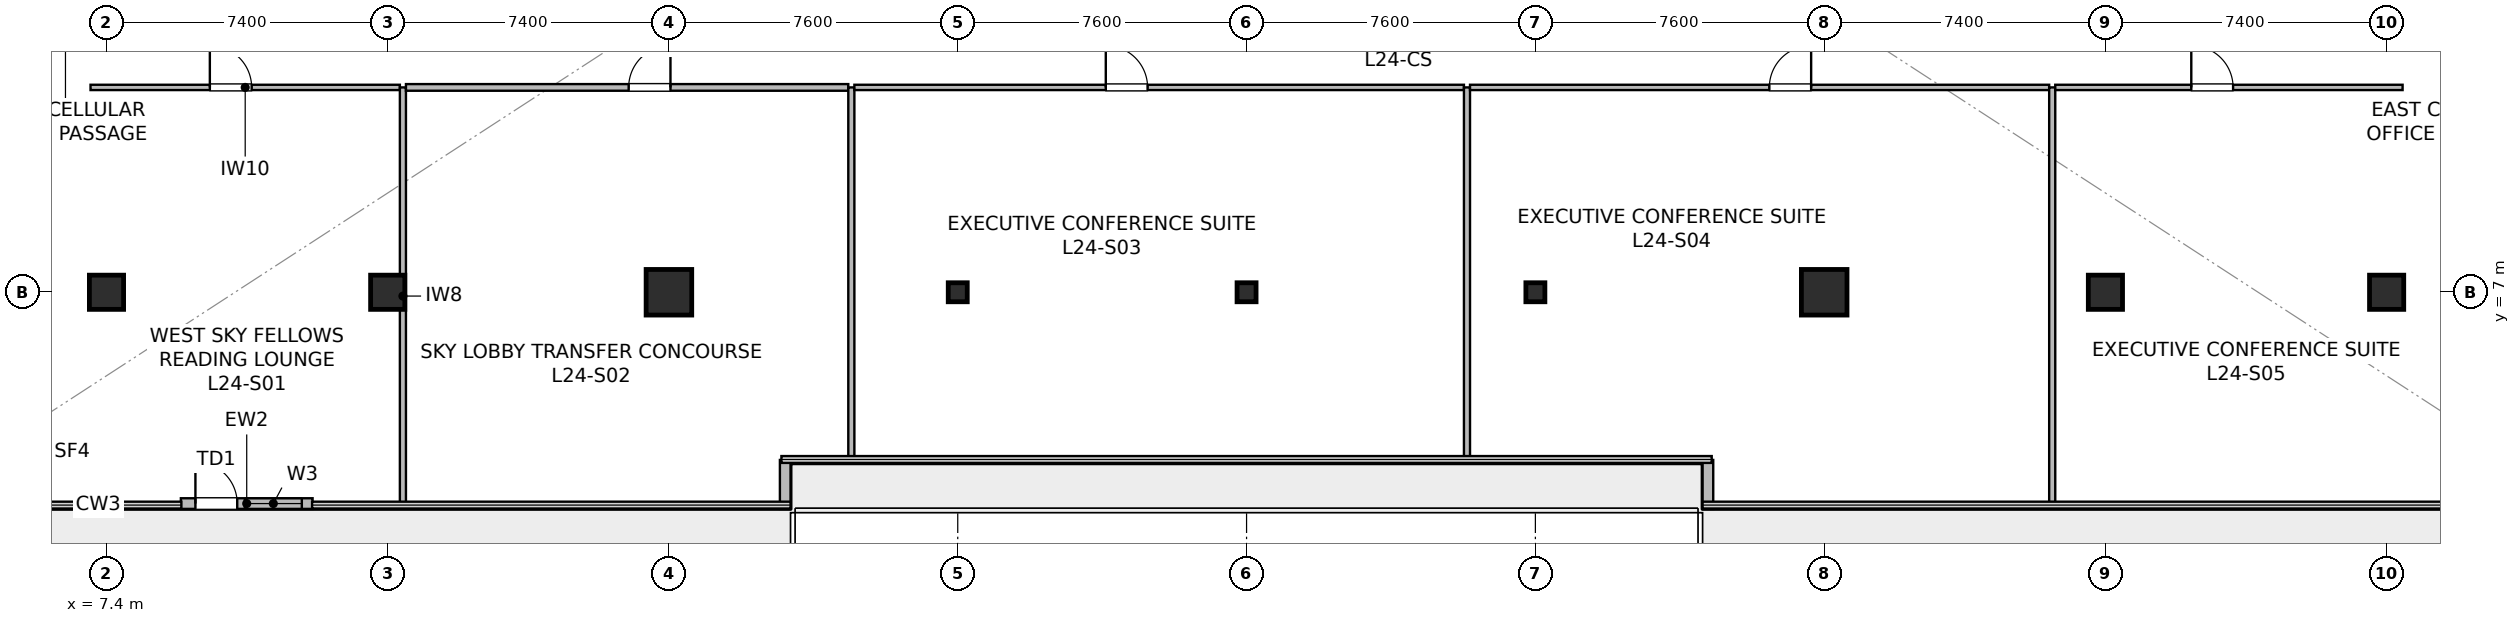
"""IFC4 building model, lengths in metres.
Left out: names, types, materials, properties, quantities, classifications, styles, units other than length and angle.
Written with IfcOpenShell. Run it as: python <this file> out.ifc"""

import sys

from ifc_helpers import new_model, si_unit, direction, frame, frame_2d, origin, origin_2d, place, context, subcontext, project, spatial, rectangle, hollow_rectangle, extrude, source, transform, mapped, element, fill, save


model = new_model("IFC4")
c1 = context("Model", 3, precision=1e-05, world=origin(), true_north=direction((0.0, 1.0)))
c2 = subcontext(c1, "Body", "Model", "MODEL_VIEW")
j1 = project(units=[si_unit("LENGTHUNIT", "METRE"), si_unit("PLANEANGLEUNIT", "RADIAN")], contexts=[c1])
p1 = place(None, origin())
s1 = spatial("IfcSite", under=j1, at=p1, CompositionType="ELEMENT")
p2 = place(p1, origin())
s2 = spatial("IfcBuilding", under=s1, at=p2, CompositionType="ELEMENT")
p3 = place(p2, frame((0.0, 0.0, 100.3)))
s3 = spatial("IfcBuildingStorey", under=s2, at=p3, CompositionType="ELEMENT", Elevation=100.3)
m1 = source(origin(), c2, "Body", "SweptSolid", [
    extrude(rectangle(XDim=0.9, YDim=0.9, at=origin_2d()), origin(), (0.0, 0.0, 1.0), 4.8),
])
p4 = place(p3, frame((14.8, 7.0, 0.0), z_axis=(0.0, 0.0, 1.0), x_axis=(1.0, 0.0, 0.0)))
e1 = element("IfcColumn", 1, at=p4, inside=s3, PredefinedType="COLUMN", context=c2, shape_type="MappedRepresentation", body=[
    mapped(m1, transform((0.0, 0.0, 0.0), scale=1.0)),
])
m2 = source(origin(), c2, "Body", "SweptSolid", [
    extrude(rectangle(XDim=1.2, YDim=1.2, at=origin_2d()), origin(), (0.0, 0.0, 1.0), 4.8),
])
for number, where, z_axis, x_axis in (
    (2, (22.2, 7.0, 0.0), (0.0, 0.0, 1.0), (1.0, 0.0, 0.0)),
    (3, (52.6, 7.0, 0.0), (0.0, 0.0, 1.0), (1.0, 0.0, 0.0)),
):
    element("IfcColumn", number, at=place(p3, frame(where, z_axis=z_axis, x_axis=x_axis)), inside=s3, PredefinedType="COLUMN", context=c2, shape_type="MappedRepresentation", body=[
        mapped(m2, transform((0.0, 0.0, 0.0), scale=1.0)),
    ])
for number, where, z_axis, x_axis in (
    (4, (60.0, 7.0, 0.0), (0.0, 0.0, 1.0), (1.0, 0.0, 0.0)),
    (5, (7.4, 7.0, 0.0), (0.0, 0.0, 1.0), (1.0, 0.0, 0.0)),
    (6, (67.4, 7.0, 0.0), (0.0, 0.0, 1.0), (1.0, 0.0, 0.0)),
):
    element("IfcColumn", number, at=place(p3, frame(where, z_axis=z_axis, x_axis=x_axis)), inside=s3, PredefinedType="COLUMN", context=c2, shape_type="MappedRepresentation", body=[
        mapped(m1, transform((0.0, 0.0, 0.0), scale=1.0)),
    ])
m3 = source(origin(), c2, "Body", "SweptSolid", [
    extrude(hollow_rectangle(XDim=0.5, YDim=0.5, WallThickness=0.022, at=origin_2d()), origin(), (0.0, 0.0, 1.0), 4.8),
])
for number, where, z_axis, x_axis in (
    (7, (29.8, 7.0, 0.0), (0.0, 0.0, 1.0), (1.0, 0.0, 0.0)),
    (8, (37.4, 7.0, 0.0), (0.0, 0.0, 1.0), (1.0, 0.0, 0.0)),
    (9, (45.0, 7.0, 0.0), (0.0, 0.0, 1.0), (1.0, 0.0, 0.0)),
):
    element("IfcColumn", number, at=place(p3, frame(where, z_axis=z_axis, x_axis=x_axis)), inside=s3, PredefinedType="COLUMN", context=c2, shape_type="MappedRepresentation", body=[
        mapped(m3, transform((0.0, 0.0, 0.0), scale=1.0)),
    ])
p5 = place(p3, frame((9.357, 1.44, 0.0), z_axis=(0.0, 0.0, 1.0), x_axis=(1.0, 0.0, 0.0)))
e10 = element("IfcWall", 10, at=p5, inside=s3, PredefinedType="STANDARD", context=c2, shape_type="SweptSolid", body=[
    extrude(rectangle(XDim=3.466, YDim=0.28, at=frame_2d((1.733, 0.0))), origin(), (0.0, 0.0, 1.0), 4.49),
])
p6 = place(p5, frame((0.383, 0.0, 0.0)))
e11 = element("IfcOpeningElement", 11, at=p6, cuts=e10, PredefinedType="OPENING", context=c2, shape_type="SweptSolid", body=[
    extrude(rectangle(XDim=1.1, YDim=2.2, at=frame_2d((0.55, 1.1))), frame((0.0, 0.15, 0.0), z_axis=(0.0, -1.0, 0.0), x_axis=(1.0, 0.0, 0.0)), (0.0, 0.0, 1.0), 0.3),
])
p7 = place(p5, frame((1.683, 0.0, 0.9)))
e12 = element("IfcOpeningElement", 12, at=p7, cuts=e10, PredefinedType="OPENING", context=c2, shape_type="SweptSolid", body=[
    extrude(rectangle(XDim=1.5, YDim=2.2, at=frame_2d((0.75, 1.1))), frame((0.0, 0.15, 0.0), z_axis=(0.0, -1.0, 0.0), x_axis=(1.0, 0.0, 0.0)), (0.0, 0.0, 1.0), 0.3),
])
for number, where, z_axis, x_axis in (
    (13, (25.26, 1.3, 0.0), (0.0, 0.0, 1.0), (0.0, 1.0, 0.0)),
    (14, (49.54, 2.588, 0.0), (0.0, 0.0, 1.0), (0.0, -1.0, 0.0)),
):
    element("IfcWall", number, at=place(p3, frame(where, z_axis=z_axis, x_axis=x_axis)), inside=s3, PredefinedType="STANDARD", context=c2, shape_type="SweptSolid", body=[
        extrude(rectangle(XDim=1.288, YDim=0.28, at=frame_2d((0.644, 0.0))), origin(), (0.0, 0.0, 1.0), 4.49),
    ])
p8 = place(p3, frame((6.98, 12.39, 0.0), z_axis=(0.0, 0.0, 1.0), x_axis=(1.0, 0.0, 0.0)))
e15 = element("IfcWall", 15, at=p8, inside=s3, PredefinedType="PARTITIONING", context=c2, shape_type="SweptSolid", body=[
    extrude(rectangle(XDim=8.14, YDim=0.14, at=frame_2d((4.07, 0.0))), origin(), (0.0, 0.0, 1.0), 3.825),
])
p9 = place(p8, frame((3.14, 0.0, 0.0)))
e16 = element("IfcOpeningElement", 16, at=p9, cuts=e15, PredefinedType="OPENING", context=c2, shape_type="SweptSolid", body=[
    extrude(rectangle(XDim=1.1, YDim=2.18, at=frame_2d((0.55, 1.09))), frame((0.0, 0.08, 0.0), z_axis=(0.0, -1.0, 0.0), x_axis=(1.0, 0.0, 0.0)), (0.0, 0.0, 1.0), 0.16),
])
p10 = place(p3, frame((15.2, 1.41, 0.0), z_axis=(0.0, 0.0, 1.0), x_axis=(0.0, 1.0, 0.0)))
e17 = element("IfcWall", 17, at=p10, inside=s3, PredefinedType="PARTITIONING", context=c2, shape_type="SweptSolid", body=[
    extrude(rectangle(XDim=10.98, YDim=0.16, at=frame_2d((5.49, 0.0))), origin(), (0.0, 0.0, 1.0), 3.775),
])
p11 = place(p3, frame((15.28, 12.39, 0.0), z_axis=(0.0, 0.0, 1.0), x_axis=(1.0, 0.0, 0.0)))
e18 = element("IfcWall", 18, at=p11, inside=s3, PredefinedType="PARTITIONING", context=c2, shape_type="SweptSolid", body=[
    extrude(rectangle(XDim=11.64, YDim=0.175, at=frame_2d((5.82, 0.0))), origin(), (0.0, 0.0, 1.0), 3.825),
])
p12 = place(p11, frame((5.86, 0.0, 0.0)))
e19 = element("IfcOpeningElement", 19, at=p12, cuts=e18, PredefinedType="OPENING", context=c2, shape_type="SweptSolid", body=[
    extrude(rectangle(XDim=1.1, YDim=2.15, at=frame_2d((0.55, 1.075))), frame((0.0, 0.098, 0.0), z_axis=(0.0, -1.0, 0.0), x_axis=(1.0, 0.0, 0.0)), (0.0, 0.0, 1.0), 0.195),
])
p13 = place(p3, frame((27.0, 2.61, 0.0), z_axis=(0.0, 0.0, 1.0), x_axis=(0.0, 1.0, 0.0)))
e20 = element("IfcWall", 20, at=p13, inside=s3, PredefinedType="PARTITIONING", context=c2, shape_type="SweptSolid", body=[
    extrude(rectangle(XDim=9.78, YDim=0.16, at=frame_2d((4.89, 0.0))), origin(), (0.0, 0.0, 1.0), 3.775),
])
p14 = place(p3, frame((27.08, 12.39, 0.0), z_axis=(0.0, 0.0, 1.0), x_axis=(1.0, 0.0, 0.0)))
e21 = element("IfcWall", 21, at=p14, inside=s3, PredefinedType="PARTITIONING", context=c2, shape_type="SweptSolid", body=[
    extrude(rectangle(XDim=16.04, YDim=0.14, at=frame_2d((8.02, 0.0))), origin(), (0.0, 0.0, 1.0), 3.825),
])
p15 = place(p14, frame((6.615, 0.0, 0.0)))
e22 = element("IfcOpeningElement", 22, at=p15, cuts=e21, PredefinedType="OPENING", context=c2, shape_type="SweptSolid", body=[
    extrude(rectangle(XDim=1.1, YDim=2.18, at=frame_2d((0.55, 1.09))), frame((0.0, 0.08, 0.0), z_axis=(0.0, -1.0, 0.0), x_axis=(1.0, 0.0, 0.0)), (0.0, 0.0, 1.0), 0.16),
])
p16 = place(p3, frame((43.2, 2.61, 0.0), z_axis=(0.0, 0.0, 1.0), x_axis=(0.0, 1.0, 0.0)))
e23 = element("IfcWall", 23, at=p16, inside=s3, PredefinedType="PARTITIONING", context=c2, shape_type="SweptSolid", body=[
    extrude(rectangle(XDim=9.78, YDim=0.16, at=frame_2d((4.89, 0.0))), origin(), (0.0, 0.0, 1.0), 3.775),
])
p17 = place(p3, frame((43.28, 12.39, 0.0), z_axis=(0.0, 0.0, 1.0), x_axis=(1.0, 0.0, 0.0)))
e24 = element("IfcWall", 24, at=p17, inside=s3, PredefinedType="PARTITIONING", context=c2, shape_type="SweptSolid", body=[
    extrude(rectangle(XDim=15.24, YDim=0.14, at=frame_2d((7.62, 0.0))), origin(), (0.0, 0.0, 1.0), 3.825),
])
p18 = place(p17, frame((7.876, 0.0, 0.0)))
e25 = element("IfcOpeningElement", 25, at=p18, cuts=e24, PredefinedType="OPENING", context=c2, shape_type="SweptSolid", body=[
    extrude(rectangle(XDim=1.1, YDim=2.18, at=frame_2d((0.55, 1.09))), frame((0.0, 0.08, 0.0), z_axis=(0.0, -1.0, 0.0), x_axis=(1.0, 0.0, 0.0)), (0.0, 0.0, 1.0), 0.16),
])
p19 = place(p3, frame((58.6, 1.41, 0.0), z_axis=(0.0, 0.0, 1.0), x_axis=(0.0, 1.0, 0.0)))
e26 = element("IfcWall", 26, at=p19, inside=s3, PredefinedType="PARTITIONING", context=c2, shape_type="SweptSolid", body=[
    extrude(rectangle(XDim=10.98, YDim=0.16, at=frame_2d((5.49, 0.0))), origin(), (0.0, 0.0, 1.0), 3.775),
])
p20 = place(p3, frame((58.68, 12.39, 0.0), z_axis=(0.0, 0.0, 1.0), x_axis=(1.0, 0.0, 0.0)))
e27 = element("IfcWall", 27, at=p20, inside=s3, PredefinedType="PARTITIONING", context=c2, shape_type="SweptSolid", body=[
    extrude(rectangle(XDim=9.14, YDim=0.14, at=frame_2d((4.57, 0.0))), origin(), (0.0, 0.0, 1.0), 3.825),
])
p21 = place(p20, frame((3.58, 0.0, 0.0)))
e28 = element("IfcOpeningElement", 28, at=p21, cuts=e27, PredefinedType="OPENING", context=c2, shape_type="SweptSolid", body=[
    extrude(rectangle(XDim=1.1, YDim=2.18, at=frame_2d((0.55, 1.09))), frame((0.0, 0.08, 0.0), z_axis=(0.0, -1.0, 0.0), x_axis=(1.0, 0.0, 0.0)), (0.0, 0.0, 1.0), 0.16),
])
m4 = source(origin(), c2, "Body", "SweptSolid", [
    extrude(rectangle(XDim=1.1, YDim=2.2, at=frame_2d((0.55, 1.1))), frame((0.0, 0.025, 0.0), z_axis=(0.0, -1.0, 0.0), x_axis=(1.0, 0.0, 0.0)), (0.0, 0.0, 1.0), 0.05),
])
p22 = place(p6, origin())
e29 = element("IfcDoor", 29, at=p22, inside=s3, OperationType="SINGLE_SWING_LEFT", PredefinedType="DOOR", context=c2, shape_type="MappedRepresentation", body=[
    mapped(m4, transform((0.0, 0.0, 0.0), scale=1.0)),
])
fill(e11, e29)
m5 = source(origin(), c2, "Body", "SweptSolid", [
    extrude(rectangle(XDim=1.5, YDim=2.2, at=frame_2d((0.75, 1.1))), frame((0.0, 0.03, 0.0), z_axis=(0.0, -1.0, 0.0), x_axis=(1.0, 0.0, 0.0)), (0.0, 0.0, 1.0), 0.06),
])
p23 = place(p7, origin())
e30 = element("IfcWindow", 30, at=p23, inside=s3, PartitioningType="SINGLE_PANEL", PredefinedType="WINDOW", context=c2, shape_type="MappedRepresentation", body=[
    mapped(m5, transform((0.0, 0.0, 0.0), scale=1.0)),
])
fill(e12, e30)
m6 = source(origin(), c2, "Body", "SweptSolid", [
    extrude(rectangle(XDim=1.1, YDim=2.18, at=frame_2d((0.55, 1.09))), frame((0.0, 0.025, 0.0), z_axis=(0.0, -1.0, 0.0), x_axis=(1.0, 0.0, 0.0)), (0.0, 0.0, 1.0), 0.05),
])
p24 = place(p9, origin())
e31 = element("IfcDoor", 31, at=p24, inside=s3, OperationType="SINGLE_SWING_LEFT", PredefinedType="DOOR", context=c2, shape_type="MappedRepresentation", body=[
    mapped(m6, transform((0.0, 0.0, 0.0), scale=1.0)),
])
fill(e16, e31)
m7 = source(origin(), c2, "Body", "SweptSolid", [
    extrude(rectangle(XDim=1.1, YDim=2.15, at=frame_2d((0.55, 1.075))), frame((0.0, 0.025, 0.0), z_axis=(0.0, -1.0, 0.0), x_axis=(1.0, 0.0, 0.0)), (0.0, 0.0, 1.0), 0.05),
])
p25 = place(p12, origin())
e32 = element("IfcDoor", 32, at=p25, inside=s3, OperationType="SINGLE_SWING_RIGHT", PredefinedType="DOOR", context=c2, shape_type="MappedRepresentation", body=[
    mapped(m7, transform((0.0, 0.0, 0.0), scale=1.0)),
])
fill(e19, e32)
p26 = place(p15, origin())
e33 = element("IfcDoor", 33, at=p26, inside=s3, OperationType="SINGLE_SWING_LEFT", PredefinedType="DOOR", context=c2, shape_type="MappedRepresentation", body=[
    mapped(m6, transform((0.0, 0.0, 0.0), scale=1.0)),
])
fill(e22, e33)
p27 = place(p18, origin())
e34 = element("IfcDoor", 34, at=p27, inside=s3, OperationType="SINGLE_SWING_RIGHT", PredefinedType="DOOR", context=c2, shape_type="MappedRepresentation", body=[
    mapped(m6, transform((0.0, 0.0, 0.0), scale=1.0)),
])
fill(e25, e34)
p28 = place(p21, origin())
e35 = element("IfcDoor", 35, at=p28, inside=s3, OperationType="SINGLE_SWING_LEFT", PredefinedType="DOOR", context=c2, shape_type="MappedRepresentation", body=[
    mapped(m6, transform((0.0, 0.0, 0.0), scale=1.0)),
])
fill(e28, e35)
save(model, sys.argv[1])
